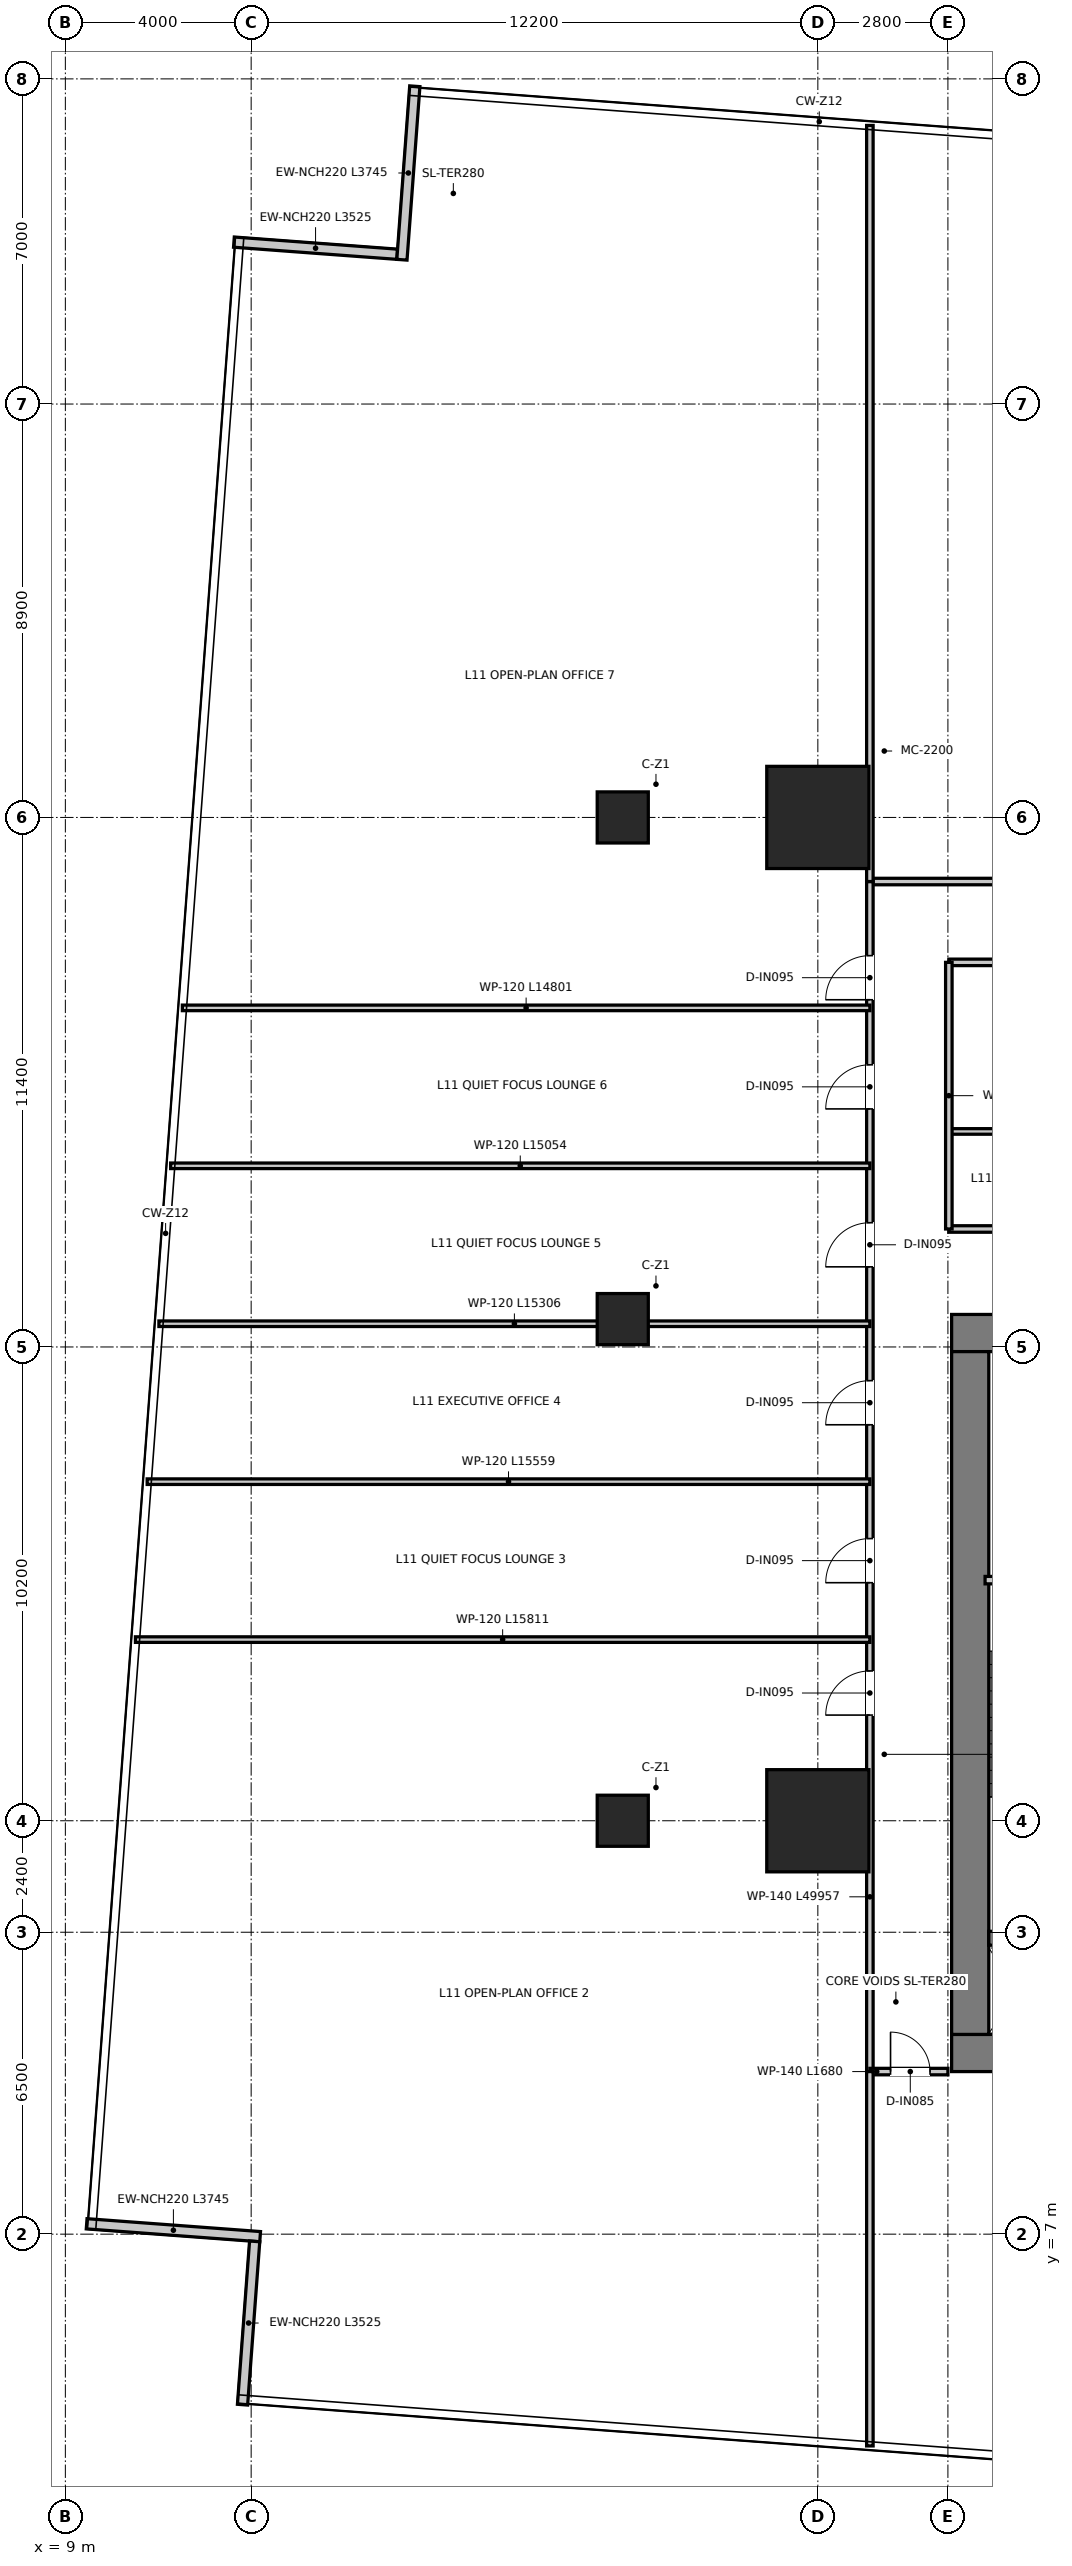
"""IFC4 building model, lengths in metres.
Left out: names, types, materials, properties, quantities, classifications, styles, units other than length and angle.
Written with IfcOpenShell. Run it as: python <this file> out.ifc"""

import sys

from ifc_helpers import new_model, si_unit, direction, frame, frame_2d, origin, origin_2d, place, context, subcontext, project, spatial, rectangle, extrude, source, transform, mapped, element, fill, save


model = new_model("IFC4")
c1 = context("Model", 3, precision=1e-05, world=origin(), true_north=direction((0.0, 1.0)))
c2 = subcontext(c1, "Body", "Model", "MODEL_VIEW")
j1 = project(units=[si_unit("LENGTHUNIT", "METRE"), si_unit("PLANEANGLEUNIT", "RADIAN")], contexts=[c1])
p1 = place(None, origin())
s1 = spatial("IfcSite", under=j1, at=p1, CompositionType="ELEMENT")
p2 = place(p1, origin())
s2 = spatial("IfcBuilding", under=s1, at=p2, CompositionType="ELEMENT")
p3 = place(p2, frame((0.0, 0.0, 48.7)))
s3 = spatial("IfcBuildingStorey", under=s2, at=p3, CompositionType="ELEMENT", Elevation=48.7)
p4 = place(p3, frame((28.08, 10.9, 0.0), z_axis=(0.0, 0.0, 1.0), x_axis=(1.0, 0.0, 0.0)))
e1 = element("IfcWall", 1, at=p4, inside=s3, PredefinedType="SHEAR", context=c2, shape_type="SweptSolid", body=[
    extrude(rectangle(XDim=15.84, YDim=0.8, at=frame_2d((7.92, 0.0))), origin(), (0.0, 0.0, 1.0), 3.95),
])
p5 = place(p3, frame((28.08, 26.4, 0.0), z_axis=(0.0, 0.0, 1.0), x_axis=(1.0, 0.0, 0.0)))
e2 = element("IfcWall", 2, at=p5, inside=s3, PredefinedType="SHEAR", context=c2, shape_type="SweptSolid", body=[
    extrude(rectangle(XDim=15.84, YDim=0.8, at=frame_2d((7.92, 0.0))), origin(), (0.0, 0.0, 1.0), 3.95),
])
p6 = place(p5, frame((7.22, 0.0, 0.0)))
e3 = element("IfcOpeningElement", 3, at=p6, cuts=e2, PredefinedType="OPENING", context=c2, shape_type="SweptSolid", body=[
    extrude(rectangle(XDim=1.4, YDim=2.2, at=frame_2d((0.7, 1.1))), frame((0.0, 0.41, 0.0), z_axis=(0.0, -1.0, 0.0), x_axis=(1.0, 0.0, 0.0)), (0.0, 0.0, 1.0), 0.82),
])
p7 = place(p5, frame((1.775, 0.0, 0.0)))
e4 = element("IfcOpeningElement", 4, at=p7, cuts=e2, PredefinedType="OPENING", context=c2, shape_type="SweptSolid", body=[
    extrude(rectangle(XDim=1.05, YDim=2.1, at=frame_2d((0.525, 1.05))), frame((0.0, 0.41, 0.0), z_axis=(0.0, -1.0, 0.0), x_axis=(1.0, 0.0, 0.0)), (0.0, 0.0, 1.0), 0.82),
])
p8 = place(p5, frame((13.015, 0.0, 0.0)))
e5 = element("IfcOpeningElement", 5, at=p8, cuts=e2, PredefinedType="OPENING", context=c2, shape_type="SweptSolid", body=[
    extrude(rectangle(XDim=1.05, YDim=2.1, at=frame_2d((0.525, 1.05))), frame((0.0, 0.41, 0.0), z_axis=(0.0, -1.0, 0.0), x_axis=(1.0, 0.0, 0.0)), (0.0, 0.0, 1.0), 0.82),
])
p9 = place(p3, frame((28.48, 11.3, 0.0), z_axis=(0.0, 0.0, 1.0), x_axis=(0.0, 1.0, 0.0)))
e6 = element("IfcWall", 6, at=p9, inside=s3, PredefinedType="SHEAR", context=c2, shape_type="SweptSolid", body=[
    extrude(rectangle(XDim=14.7, YDim=0.8, at=frame_2d((7.35, 0.0))), origin(), (0.0, 0.0, 1.0), 3.95),
])
p10 = place(p3, frame((28.88, 13.37, 0.0), z_axis=(0.0, 0.0, 1.0), x_axis=(1.0, 0.0, 0.0)))
e7 = element("IfcWall", 7, at=p10, inside=s3, PredefinedType="SHEAR", context=c2, shape_type="SweptSolid", body=[
    extrude(rectangle(XDim=3.1, YDim=0.3, at=frame_2d((1.55, 0.0))), origin(), (0.0, 0.0, 1.0), 3.95),
])
m1 = source(origin(), c2, "Body", "SweptSolid", [
    extrude(rectangle(XDim=2.2, YDim=2.2, at=origin_2d()), origin(), (0.0, 0.0, 1.0), 3.95),
])
for number, where, z_axis, x_axis in (
    (8, (25.2, 15.9, 0.0), (0.0, 0.0, 1.0), (1.0, 0.0, 0.0)),
    (9, (25.2, 37.5, 0.0), (0.0, 0.0, 1.0), (1.0, 0.0, 0.0)),
):
    element("IfcColumn", number, at=place(p3, frame(where, z_axis=z_axis, x_axis=x_axis)), inside=s3, PredefinedType="USERDEFINED", context=c2, shape_type="MappedRepresentation", body=[
        mapped(m1, transform((0.0, 0.0, 0.0), x_axis=(1.0, 0.0, 0.0), y_axis=(0.0, 1.0, 0.0), z_axis=(0.0, 0.0, 1.0), scale=1.0)),
    ])
m2 = source(origin(), c2, "Body", "SweptSolid", [
    extrude(rectangle(XDim=1.1, YDim=1.1, at=origin_2d()), origin(), (0.0, 0.0, 1.0), 3.95),
])
for number, where, z_axis, x_axis in (
    (10, (21.0, 15.9, 0.0), (0.0, 0.0, 1.0), (1.0, 0.0, 0.0)),
    (11, (21.0, 26.7, 0.0), (0.0, 0.0, 1.0), (1.0, 0.0, 0.0)),
    (12, (21.0, 37.5, 0.0), (0.0, 0.0, 1.0), (1.0, 0.0, 0.0)),
):
    element("IfcColumn", number, at=place(p3, frame(where, z_axis=z_axis, x_axis=x_axis)), inside=s3, PredefinedType="COLUMN", context=c2, shape_type="MappedRepresentation", body=[
        mapped(m2, transform((0.0, 0.0, 0.0), x_axis=(1.0, 0.0, 0.0), y_axis=(0.0, 1.0, 0.0), z_axis=(0.0, 0.0, 1.0), scale=1.0)),
    ])
p11 = place(p3, frame((16.144, 49.625, 0.0), z_axis=(0.0, 0.0, 1.0), x_axis=(-0.997250341397, 0.074106386922, 0.0)))
e13 = element("IfcWall", 13, at=p11, inside=s3, PredefinedType="ELEMENTEDWALL", context=c2, shape_type="SweptSolid", body=[
    extrude(rectangle(XDim=3.525, YDim=0.22, at=frame_2d((1.763, 0.0))), origin(), (0.0, 0.0, 1.0), 3.67),
])
p12 = place(p3, frame((9.459, 7.223, 0.0), z_axis=(0.0, 0.0, 1.0), x_axis=(0.997249045342, -0.074123825884, 0.0)))
e14 = element("IfcWall", 14, at=p12, inside=s3, PredefinedType="ELEMENTEDWALL", context=c2, shape_type="SweptSolid", body=[
    extrude(rectangle(XDim=3.745, YDim=0.22, at=frame_2d((1.873, 0.0))), origin(), (0.0, 0.0, 1.0), 3.67),
])
p13 = place(p3, frame((13.075, 6.844, 0.0), z_axis=(0.0, 0.0, 1.0), x_axis=(-0.074111505645, -0.997249961008, 0.0)))
e15 = element("IfcWall", 15, at=p13, inside=s3, PredefinedType="ELEMENTEDWALL", context=c2, shape_type="SweptSolid", body=[
    extrude(rectangle(XDim=3.525, YDim=0.22, at=frame_2d((1.762, 0.0))), origin(), (0.0, 0.0, 1.0), 3.67),
])
p14 = place(p3, frame((16.523, 53.241, 0.0), z_axis=(0.0, 0.0, 1.0), x_axis=(-0.074119007176, -0.997249403497, 0.0)))
e16 = element("IfcWall", 16, at=p14, inside=s3, PredefinedType="ELEMENTEDWALL", context=c2, shape_type="SweptSolid", body=[
    extrude(rectangle(XDim=3.745, YDim=0.22, at=frame_2d((1.873, 0.0))), origin(), (0.0, 0.0, 1.0), 3.67),
])
p15 = place(p3, frame((28.8, 21.08, 0.0), z_axis=(0.0, 0.0, 1.0), x_axis=(1.0, 0.0, 0.0)))
e17 = element("IfcWall", 17, at=p15, inside=s3, PredefinedType="PARTITIONING", context=c2, shape_type="SweptSolid", body=[
    extrude(rectangle(XDim=3.16, YDim=0.16, at=frame_2d((1.58, 0.0))), origin(), (0.0, 0.0, 1.0), 3.67),
])
p16 = place(p15, frame((1.055, 0.0, 0.0)))
e18 = element("IfcOpeningElement", 18, at=p16, cuts=e17, PredefinedType="OPENING", context=c2, shape_type="SweptSolid", body=[
    extrude(rectangle(XDim=1.05, YDim=2.1, at=frame_2d((0.525, 1.05))), frame((0.0, 0.09, 0.0), z_axis=(0.0, -1.0, 0.0), x_axis=(1.0, 0.0, 0.0)), (0.0, 0.0, 1.0), 0.18),
])
p17 = place(p3, frame((28.02, 28.64, 0.0), z_axis=(0.0, 0.0, 1.0), x_axis=(1.0, 0.0, 0.0)))
e19 = element("IfcWall", 19, at=p17, inside=s3, PredefinedType="PARTITIONING", context=c2, shape_type="SweptSolid", body=[
    extrude(rectangle(XDim=15.96, YDim=0.14, at=frame_2d((7.98, 0.0))), origin(), (0.0, 0.0, 1.0), 3.08),
])
p18 = place(p17, frame((7.455, 0.0, 0.0)))
e20 = element("IfcOpeningElement", 20, at=p18, cuts=e19, PredefinedType="OPENING", context=c2, shape_type="SweptSolid", body=[
    extrude(rectangle(XDim=1.05, YDim=2.15, at=frame_2d((0.525, 1.075))), frame((0.0, 0.08, 0.0), z_axis=(0.0, -1.0, 0.0), x_axis=(1.0, 0.0, 0.0)), (0.0, 0.0, 1.0), 0.16),
])
p19 = place(p3, frame((28.02, 30.74, 0.0), z_axis=(0.0, 0.0, 1.0), x_axis=(1.0, 0.0, 0.0)))
e21 = element("IfcWall", 21, at=p19, inside=s3, PredefinedType="PARTITIONING", context=c2, shape_type="SweptSolid", body=[
    extrude(rectangle(XDim=15.96, YDim=0.12, at=frame_2d((7.98, 0.0))), origin(), (0.0, 0.0, 1.0), 3.08),
])
p20 = place(p3, frame((28.02, 34.38, 0.0), z_axis=(0.0, 0.0, 1.0), x_axis=(1.0, 0.0, 0.0)))
e22 = element("IfcWall", 22, at=p20, inside=s3, PredefinedType="PARTITIONING", context=c2, shape_type="SweptSolid", body=[
    extrude(rectangle(XDim=15.96, YDim=0.14, at=frame_2d((7.98, 0.0))), origin(), (0.0, 0.0, 1.0), 3.08),
])
p21 = place(p20, frame((7.83, 0.0, 0.0)))
e23 = element("IfcOpeningElement", 23, at=p21, cuts=e22, PredefinedType="OPENING", context=c2, shape_type="SweptSolid", body=[
    extrude(rectangle(XDim=0.9, YDim=2.1, at=frame_2d((0.45, 1.05))), frame((0.0, 0.08, 0.0), z_axis=(0.0, -1.0, 0.0), x_axis=(1.0, 0.0, 0.0)), (0.0, 0.0, 1.0), 0.16),
])
p22 = place(p20, frame((11.03, 0.0, 0.0)))
e24 = element("IfcOpeningElement", 24, at=p22, cuts=e22, PredefinedType="OPENING", context=c2, shape_type="SweptSolid", body=[
    extrude(rectangle(XDim=0.9, YDim=2.1, at=frame_2d((0.45, 1.05))), frame((0.0, 0.08, 0.0), z_axis=(0.0, -1.0, 0.0), x_axis=(1.0, 0.0, 0.0)), (0.0, 0.0, 1.0), 0.16),
])
p23 = place(p20, frame((14.055, 0.0, 0.0)))
e25 = element("IfcOpeningElement", 25, at=p23, cuts=e22, PredefinedType="OPENING", context=c2, shape_type="SweptSolid", body=[
    extrude(rectangle(XDim=0.95, YDim=2.1, at=frame_2d((0.475, 1.05))), frame((0.0, 0.08, 0.0), z_axis=(0.0, -1.0, 0.0), x_axis=(1.0, 0.0, 0.0)), (0.0, 0.0, 1.0), 0.16),
])
p24 = place(p20, frame((2.855, 0.0, 0.0)))
e26 = element("IfcOpeningElement", 26, at=p24, cuts=e22, PredefinedType="OPENING", context=c2, shape_type="SweptSolid", body=[
    extrude(rectangle(XDim=0.95, YDim=2.1, at=frame_2d((0.475, 1.05))), frame((0.0, 0.08, 0.0), z_axis=(0.0, -1.0, 0.0), x_axis=(1.0, 0.0, 0.0)), (0.0, 0.0, 1.0), 0.16),
])
p25 = place(p3, frame((28.02, 28.64, 0.0), z_axis=(0.0, 0.0, 1.0), x_axis=(0.0, 1.0, 0.0)))
e27 = element("IfcWall", 27, at=p25, inside=s3, PredefinedType="PARTITIONING", context=c2, shape_type="SweptSolid", body=[
    extrude(rectangle(XDim=5.74, YDim=0.14, at=frame_2d((2.87, 0.0))), origin(), (0.0, 0.0, 1.0), 3.22),
])
p26 = place(p3, frame((26.32, 36.12, 0.0), z_axis=(0.0, 0.0, 1.0), x_axis=(1.0, 0.0, 0.0)))
e28 = element("IfcWall", 28, at=p26, inside=s3, PredefinedType="PARTITIONING", context=c2, shape_type="SweptSolid", body=[
    extrude(rectangle(XDim=19.36, YDim=0.14, at=frame_2d((9.68, 0.0))), origin(), (0.0, 0.0, 1.0), 3.08),
])
p27 = place(p26, frame((9.205, 0.0, 0.0)))
e29 = element("IfcOpeningElement", 29, at=p27, cuts=e28, PredefinedType="OPENING", context=c2, shape_type="SweptSolid", body=[
    extrude(rectangle(XDim=0.95, YDim=2.1, at=frame_2d((0.475, 1.05))), frame((0.0, 0.08, 0.0), z_axis=(0.0, -1.0, 0.0), x_axis=(1.0, 0.0, 0.0)), (0.0, 0.0, 1.0), 0.16),
])
p28 = place(p3, frame((26.32, 10.5, 0.0), z_axis=(0.0, 0.0, 1.0), x_axis=(0.0, 1.0, 0.0)))
e30 = element("IfcWall", 30, at=p28, inside=s3, PredefinedType="PARTITIONING", context=c2, shape_type="SweptSolid", body=[
    extrude(rectangle(XDim=25.62, YDim=0.14, at=frame_2d((12.81, 0.0))), origin(), (0.0, 0.0, 1.0), 2.97),
])
p29 = place(p28, frame((7.675, 0.0, 0.0)))
e31 = element("IfcOpeningElement", 31, at=p29, cuts=e30, PredefinedType="OPENING", context=c2, shape_type="SweptSolid", body=[
    extrude(rectangle(XDim=0.95, YDim=2.1, at=frame_2d((0.475, 1.05))), frame((0.0, 0.08, 0.0), z_axis=(0.0, -1.0, 0.0), x_axis=(1.0, 0.0, 0.0)), (0.0, 0.0, 1.0), 0.16),
])
p30 = place(p28, frame((10.525, 0.0, 0.0)))
e32 = element("IfcOpeningElement", 32, at=p30, cuts=e30, PredefinedType="OPENING", context=c2, shape_type="SweptSolid", body=[
    extrude(rectangle(XDim=0.95, YDim=2.1, at=frame_2d((0.475, 1.05))), frame((0.0, 0.08, 0.0), z_axis=(0.0, -1.0, 0.0), x_axis=(1.0, 0.0, 0.0)), (0.0, 0.0, 1.0), 0.16),
])
p31 = place(p28, frame((13.925, 0.0, 0.0)))
e33 = element("IfcOpeningElement", 33, at=p31, cuts=e30, PredefinedType="OPENING", context=c2, shape_type="SweptSolid", body=[
    extrude(rectangle(XDim=0.95, YDim=2.1, at=frame_2d((0.475, 1.05))), frame((0.0, 0.08, 0.0), z_axis=(0.0, -1.0, 0.0), x_axis=(1.0, 0.0, 0.0)), (0.0, 0.0, 1.0), 0.16),
])
p32 = place(p28, frame((17.325, 0.0, 0.0)))
e34 = element("IfcOpeningElement", 34, at=p32, cuts=e30, PredefinedType="OPENING", context=c2, shape_type="SweptSolid", body=[
    extrude(rectangle(XDim=0.95, YDim=2.1, at=frame_2d((0.475, 1.05))), frame((0.0, 0.08, 0.0), z_axis=(0.0, -1.0, 0.0), x_axis=(1.0, 0.0, 0.0)), (0.0, 0.0, 1.0), 0.16),
])
p33 = place(p28, frame((20.725, 0.0, 0.0)))
e35 = element("IfcOpeningElement", 35, at=p33, cuts=e30, PredefinedType="OPENING", context=c2, shape_type="SweptSolid", body=[
    extrude(rectangle(XDim=0.95, YDim=2.1, at=frame_2d((0.475, 1.05))), frame((0.0, 0.08, 0.0), z_axis=(0.0, -1.0, 0.0), x_axis=(1.0, 0.0, 0.0)), (0.0, 0.0, 1.0), 0.16),
])
p34 = place(p28, frame((23.075, 0.0, 0.0)))
e36 = element("IfcOpeningElement", 36, at=p34, cuts=e30, PredefinedType="OPENING", context=c2, shape_type="SweptSolid", body=[
    extrude(rectangle(XDim=0.95, YDim=2.1, at=frame_2d((0.475, 1.05))), frame((0.0, 0.08, 0.0), z_axis=(0.0, -1.0, 0.0), x_axis=(1.0, 0.0, 0.0)), (0.0, 0.0, 1.0), 0.16),
])
p35 = place(p3, frame((26.32, 10.5, 0.0), z_axis=(0.0, 0.0, 1.0), x_axis=(1.0, 0.0, 0.0)))
e37 = element("IfcWall", 37, at=p35, inside=s3, PredefinedType="PARTITIONING", context=c2, shape_type="SweptSolid", body=[
    extrude(rectangle(XDim=1.68, YDim=0.14, at=frame_2d((0.84, 0.0))), origin(), (0.0, 0.0, 1.0), 3.67),
])
p36 = place(p35, frame((0.445, 0.0, 0.0)))
e38 = element("IfcOpeningElement", 38, at=p36, cuts=e37, PredefinedType="OPENING", context=c2, shape_type="SweptSolid", body=[
    extrude(rectangle(XDim=0.85, YDim=2.1, at=frame_2d((0.425, 1.05))), frame((0.0, 0.08, 0.0), z_axis=(0.0, -1.0, 0.0), x_axis=(1.0, 0.0, 0.0)), (0.0, 0.0, 1.0), 0.16),
])
p37 = place(p3, frame((26.32, 36.12, 0.0), z_axis=(0.0, 0.0, 1.0), x_axis=(0.0, 1.0, 0.0)))
e39 = element("IfcWall", 39, at=p37, inside=s3, PredefinedType="PARTITIONING", context=c2, shape_type="SweptSolid", body=[
    extrude(rectangle(XDim=16.278, YDim=0.14, at=frame_2d((8.139, 0.0))), origin(), (0.0, 0.0, 1.0), 2.97),
])
p38 = place(p3, frame((26.32, 2.441, 0.0), z_axis=(0.0, 0.0, 1.0), x_axis=(0.0, 1.0, 0.0)))
e40 = element("IfcWall", 40, at=p38, inside=s3, PredefinedType="PARTITIONING", context=c2, shape_type="SweptSolid", body=[
    extrude(rectangle(XDim=8.059, YDim=0.14, at=frame_2d((4.03, 0.0))), origin(), (0.0, 0.0, 1.0), 3.67),
])
p39 = place(p3, frame((10.509, 19.8, 0.0), z_axis=(0.0, 0.0, 1.0), x_axis=(1.0, 0.0, 0.0)))
e41 = element("IfcWall", 41, at=p39, inside=s3, PredefinedType="PARTITIONING", context=c2, shape_type="SweptSolid", body=[
    extrude(rectangle(XDim=15.812, YDim=0.12, at=frame_2d((7.906, 0.0))), origin(), (0.0, 0.0, 1.0), 2.97),
])
p40 = place(p3, frame((10.761, 23.2, 0.0), z_axis=(0.0, 0.0, 1.0), x_axis=(1.0, 0.0, 0.0)))
e42 = element("IfcWall", 42, at=p40, inside=s3, PredefinedType="PARTITIONING", context=c2, shape_type="SweptSolid", body=[
    extrude(rectangle(XDim=15.559, YDim=0.12, at=frame_2d((7.779, 0.0))), origin(), (0.0, 0.0, 1.0), 2.97),
])
p41 = place(p3, frame((11.014, 26.6, 0.0), z_axis=(0.0, 0.0, 1.0), x_axis=(1.0, 0.0, 0.0)))
e43 = element("IfcWall", 43, at=p41, inside=s3, PredefinedType="PARTITIONING", context=c2, shape_type="SweptSolid", body=[
    extrude(rectangle(XDim=15.306, YDim=0.12, at=frame_2d((7.653, 0.0))), origin(), (0.0, 0.0, 1.0), 2.97),
])
p42 = place(p3, frame((11.267, 30.0, 0.0), z_axis=(0.0, 0.0, 1.0), x_axis=(1.0, 0.0, 0.0)))
e44 = element("IfcWall", 44, at=p42, inside=s3, PredefinedType="PARTITIONING", context=c2, shape_type="SweptSolid", body=[
    extrude(rectangle(XDim=15.053, YDim=0.12, at=frame_2d((7.527, 0.0))), origin(), (0.0, 0.0, 1.0), 2.97),
])
p43 = place(p3, frame((11.519, 33.4, 0.0), z_axis=(0.0, 0.0, 1.0), x_axis=(1.0, 0.0, 0.0)))
e45 = element("IfcWall", 45, at=p43, inside=s3, PredefinedType="PARTITIONING", context=c2, shape_type="SweptSolid", body=[
    extrude(rectangle(XDim=14.801, YDim=0.12, at=frame_2d((7.4, 0.0))), origin(), (0.0, 0.0, 1.0), 2.97),
])
p44 = place(p29, origin())
e46 = element("IfcDoor", 46, at=p44, inside=s3, OperationType="SINGLE_SWING_LEFT", PredefinedType="DOOR", context=c2, shape_type="SweptSolid", body=[
    extrude(rectangle(XDim=0.95, YDim=2.1, at=frame_2d((0.475, 1.05))), frame((0.0, 0.025, 0.0), z_axis=(0.0, -1.0, 0.0), x_axis=(1.0, 0.0, 0.0)), (0.0, 0.0, 1.0), 0.05),
])
fill(e31, e46)
p45 = place(p30, origin())
e47 = element("IfcDoor", 47, at=p45, inside=s3, OperationType="SINGLE_SWING_LEFT", PredefinedType="DOOR", context=c2, shape_type="SweptSolid", body=[
    extrude(rectangle(XDim=0.95, YDim=2.1, at=frame_2d((0.475, 1.05))), frame((0.0, 0.025, 0.0), z_axis=(0.0, -1.0, 0.0), x_axis=(1.0, 0.0, 0.0)), (0.0, 0.0, 1.0), 0.05),
])
fill(e32, e47)
p46 = place(p31, origin())
e48 = element("IfcDoor", 48, at=p46, inside=s3, OperationType="SINGLE_SWING_LEFT", PredefinedType="DOOR", context=c2, shape_type="SweptSolid", body=[
    extrude(rectangle(XDim=0.95, YDim=2.1, at=frame_2d((0.475, 1.05))), frame((0.0, 0.025, 0.0), z_axis=(0.0, -1.0, 0.0), x_axis=(1.0, 0.0, 0.0)), (0.0, 0.0, 1.0), 0.05),
])
fill(e33, e48)
p47 = place(p32, origin())
e49 = element("IfcDoor", 49, at=p47, inside=s3, OperationType="SINGLE_SWING_LEFT", PredefinedType="DOOR", context=c2, shape_type="SweptSolid", body=[
    extrude(rectangle(XDim=0.95, YDim=2.1, at=frame_2d((0.475, 1.05))), frame((0.0, 0.025, 0.0), z_axis=(0.0, -1.0, 0.0), x_axis=(1.0, 0.0, 0.0)), (0.0, 0.0, 1.0), 0.05),
])
fill(e34, e49)
p48 = place(p33, origin())
e50 = element("IfcDoor", 50, at=p48, inside=s3, OperationType="SINGLE_SWING_LEFT", PredefinedType="DOOR", context=c2, shape_type="SweptSolid", body=[
    extrude(rectangle(XDim=0.95, YDim=2.1, at=frame_2d((0.475, 1.05))), frame((0.0, 0.025, 0.0), z_axis=(0.0, -1.0, 0.0), x_axis=(1.0, 0.0, 0.0)), (0.0, 0.0, 1.0), 0.05),
])
fill(e35, e50)
p49 = place(p34, origin())
e51 = element("IfcDoor", 51, at=p49, inside=s3, OperationType="SINGLE_SWING_LEFT", PredefinedType="DOOR", context=c2, shape_type="SweptSolid", body=[
    extrude(rectangle(XDim=0.95, YDim=2.1, at=frame_2d((0.475, 1.05))), frame((0.0, 0.025, 0.0), z_axis=(0.0, -1.0, 0.0), x_axis=(1.0, 0.0, 0.0)), (0.0, 0.0, 1.0), 0.05),
])
fill(e36, e51)
p50 = place(p36, origin())
e52 = element("IfcDoor", 52, at=p50, inside=s3, OperationType="SINGLE_SWING_LEFT", PredefinedType="DOOR", context=c2, shape_type="SweptSolid", body=[
    extrude(rectangle(XDim=0.85, YDim=2.1, at=frame_2d((0.425, 1.05))), frame((0.0, 0.025, 0.0), z_axis=(0.0, -1.0, 0.0), x_axis=(1.0, 0.0, 0.0)), (0.0, 0.0, 1.0), 0.05),
])
fill(e38, e52)
save(model, sys.argv[1])
